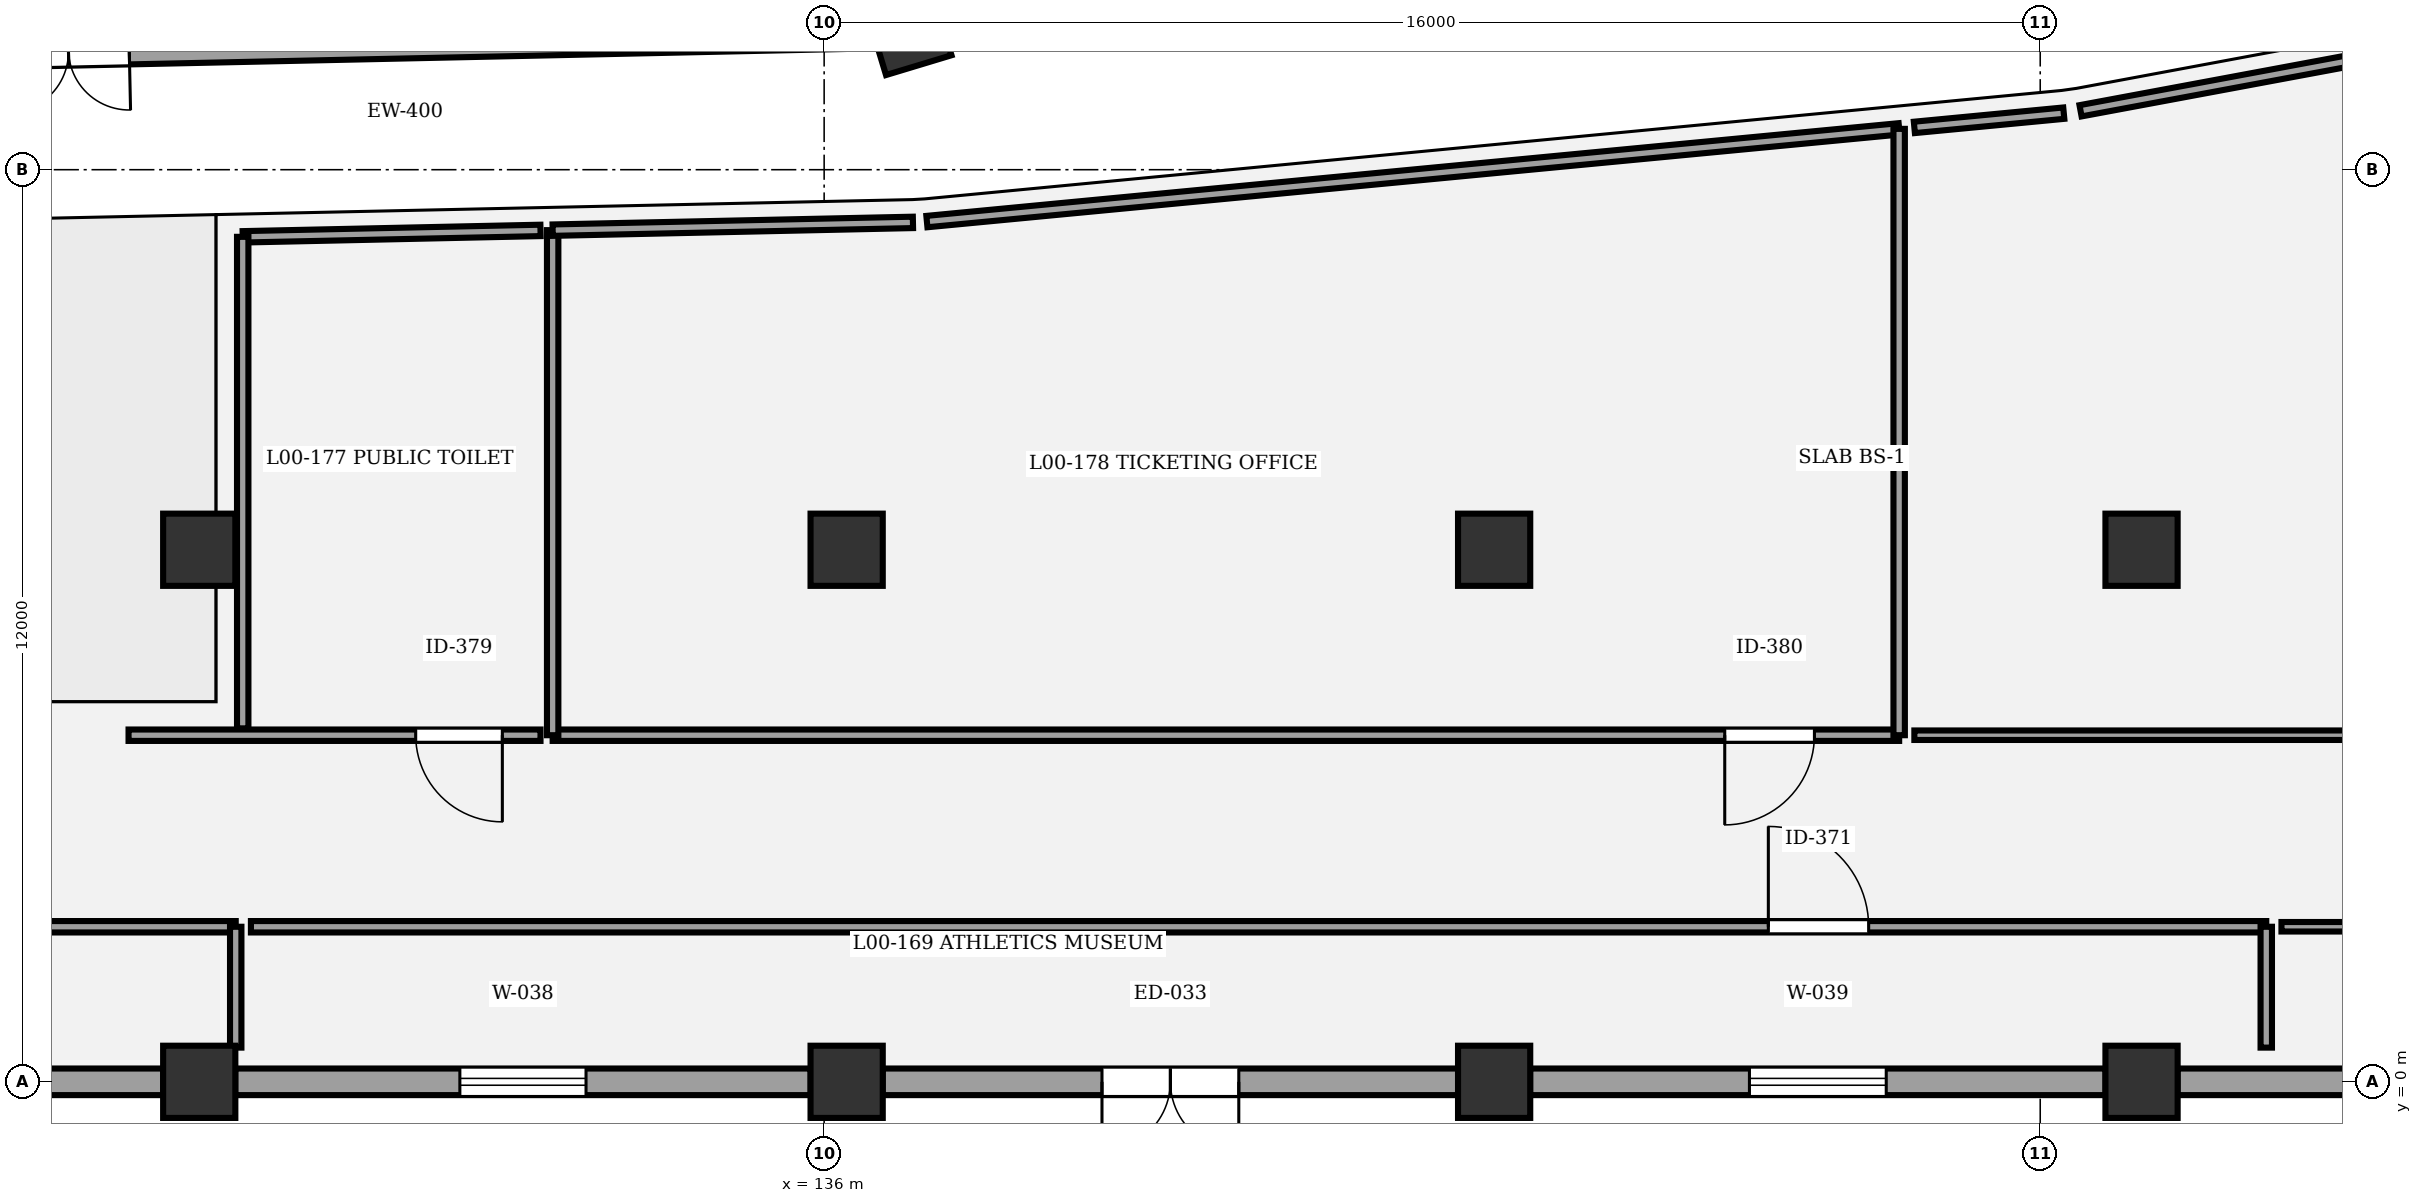
"""IFC4 building model, lengths in metres.
Left out: names, types, materials, properties, quantities, classifications, styles, units other than length and angle.
Written with IfcOpenShell. Run it as: python <this file> out.ifc"""

import sys

from ifc_helpers import new_model, si_unit, direction, frame, frame_2d, origin, origin_2d, place, context, subcontext, project, spatial, rectangle, circle, extrude, element, fill, save


model = new_model("IFC4")
c1 = context("Model", 3, precision=1e-05, world=origin(), true_north=direction((0.0, 1.0)))
c2 = subcontext(c1, "Body", "Model", "MODEL_VIEW")
j1 = project(units=[si_unit("LENGTHUNIT", "METRE"), si_unit("PLANEANGLEUNIT", "RADIAN")], contexts=[c1])
p1 = place(None, origin())
s1 = spatial("IfcSite", under=j1, at=p1, CompositionType="ELEMENT")
p2 = place(p1, origin())
s2 = spatial("IfcBuilding", under=s1, at=p2, CompositionType="ELEMENT")
p3 = place(p2, origin())
s3 = spatial("IfcBuildingStorey", under=s2, at=p3, CompositionType="ELEMENT", Elevation=0.0)
p4 = place(p3, frame((137.115, 13.806, 0.0), z_axis=(0.0, 0.0, 1.0), x_axis=(0.289198876314, -0.957269037387, 0.0)))
e1 = element("IfcColumn", 1, at=p4, inside=s3, PredefinedType="COLUMN", context=c2, shape_type="SweptSolid", body=[
    extrude(rectangle(XDim=0.9, YDim=0.9, at=origin_2d()), origin(), (0.0, 0.0, 1.0), 5.4),
])
for number, where, z_axis, x_axis in (
    (2, (127.778, 0.0, 0.0), (0.0, 0.0, 1.0), (1.0, 0.0, 0.0)),
    (3, (127.778, 7.0, 0.0), (0.0, 0.0, 1.0), (1.0, 0.0, 0.0)),
    (4, (136.296, 0.0, 0.0), (0.0, 0.0, 1.0), (1.0, 0.0, 0.0)),
    (5, (136.296, 7.0, 0.0), (0.0, 0.0, 1.0), (1.0, 0.0, 0.0)),
    (6, (144.815, 0.0, 0.0), (0.0, 0.0, 1.0), (1.0, 0.0, 0.0)),
    (7, (144.815, 7.0, 0.0), (0.0, 0.0, 1.0), (1.0, 0.0, 0.0)),
    (8, (153.333, 0.0, 0.0), (0.0, 0.0, 1.0), (1.0, 0.0, 0.0)),
    (9, (153.333, 7.0, 0.0), (0.0, 0.0, 1.0), (1.0, 0.0, 0.0)),
):
    element("IfcColumn", number, at=place(p3, frame(where, z_axis=z_axis, x_axis=x_axis)), inside=s3, PredefinedType="COLUMN", context=c2, shape_type="SweptSolid", body=[
        extrude(circle(Radius=0.475, at=origin_2d()), origin(), (0.0, 0.0, 1.0), 5.4),
    ])
p5 = place(p3, frame((136.667, 13.797, 0.0), z_axis=(0.0, 0.0, 1.0), x_axis=(-0.999768115817, -0.021534033422, 0.0)))
e10 = element("IfcWall", 10, at=p5, inside=s3, PredefinedType="STANDARD", context=c2, shape_type="SweptSolid", body=[
    extrude(rectangle(XDim=21.224, YDim=0.4, at=frame_2d((10.612, 0.0))), origin(), (0.0, 0.0, 1.0), 4.25),
])
p6 = place(p5, frame((9.812, 0.0, 0.0)))
e11 = element("IfcOpeningElement", 11, at=p6, cuts=e10, PredefinedType="OPENING", context=c2, shape_type="SweptSolid", body=[
    extrude(rectangle(XDim=1.6, YDim=2.3, at=frame_2d((0.8, 1.15))), frame((0.0, 0.21, 0.0), z_axis=(0.0, -1.0, 0.0), x_axis=(1.0, 0.0, 0.0)), (0.0, 0.0, 1.0), 0.42),
])
p7 = place(p3, frame((127.305, 0.0, 0.0), z_axis=(0.0, 0.0, 1.0), x_axis=(-1.0, 0.0, 0.0)))
e12 = element("IfcWall", 12, at=p7, inside=s3, PredefinedType="STANDARD", context=c2, shape_type="SweptSolid", body=[
    extrude(rectangle(XDim=7.573, YDim=0.35, at=frame_2d((3.787, 0.0))), origin(), (0.0, 0.0, 1.0), 4.16),
])
p8 = place(p7, frame((2.937, 0.0, 0.0)))
e13 = element("IfcOpeningElement", 13, at=p8, cuts=e12, PredefinedType="OPENING", context=c2, shape_type="SweptSolid", body=[
    extrude(rectangle(XDim=1.7, YDim=2.35, at=frame_2d((0.85, 1.175))), frame((0.0, 0.185, 0.0), z_axis=(0.0, -1.0, 0.0), x_axis=(1.0, 0.0, 0.0)), (0.0, 0.0, 1.0), 0.37),
])
p9 = place(p3, frame((135.823, 0.0, 0.0), z_axis=(0.0, 0.0, 1.0), x_axis=(-1.0, 0.0, 0.0)))
e14 = element("IfcWall", 14, at=p9, inside=s3, PredefinedType="STANDARD", context=c2, shape_type="SweptSolid", body=[
    extrude(rectangle(XDim=7.572, YDim=0.35, at=frame_2d((3.786, 0.0))), origin(), (0.0, 0.0, 1.0), 4.16),
])
p10 = place(p9, frame((2.956, 0.0, 0.9)))
e15 = element("IfcOpeningElement", 15, at=p10, cuts=e14, PredefinedType="OPENING", context=c2, shape_type="SweptSolid", body=[
    extrude(rectangle(XDim=1.66, YDim=2.15, at=frame_2d((0.83, 1.075))), frame((0.0, 0.185, 0.0), z_axis=(0.0, -1.0, 0.0), x_axis=(1.0, 0.0, 0.0)), (0.0, 0.0, 1.0), 0.37),
])
p11 = place(p3, frame((144.342, 0.0, 0.0), z_axis=(0.0, 0.0, 1.0), x_axis=(-1.0, 0.0, 0.0)))
e16 = element("IfcWall", 16, at=p11, inside=s3, PredefinedType="STANDARD", context=c2, shape_type="SweptSolid", body=[
    extrude(rectangle(XDim=7.573, YDim=0.35, at=frame_2d((3.787, 0.0))), origin(), (0.0, 0.0, 1.0), 4.16),
])
p12 = place(p11, frame((2.886, 0.0, 0.0)))
e17 = element("IfcOpeningElement", 17, at=p12, cuts=e16, PredefinedType="OPENING", context=c2, shape_type="SweptSolid", body=[
    extrude(rectangle(XDim=1.8, YDim=2.4, at=frame_2d((0.9, 1.2))), frame((0.0, 0.185, 0.0), z_axis=(0.0, -1.0, 0.0), x_axis=(1.0, 0.0, 0.0)), (0.0, 0.0, 1.0), 0.37),
])
p13 = place(p3, frame((152.86, 0.0, 0.0), z_axis=(0.0, 0.0, 1.0), x_axis=(-1.0, 0.0, 0.0)))
e18 = element("IfcWall", 18, at=p13, inside=s3, PredefinedType="STANDARD", context=c2, shape_type="SweptSolid", body=[
    extrude(rectangle(XDim=7.572, YDim=0.35, at=frame_2d((3.786, 0.0))), origin(), (0.0, 0.0, 1.0), 4.16),
])
p14 = place(p13, frame((2.886, 0.0, 0.9)))
e19 = element("IfcOpeningElement", 19, at=p14, cuts=e18, PredefinedType="OPENING", context=c2, shape_type="SweptSolid", body=[
    extrude(rectangle(XDim=1.8, YDim=2.15, at=frame_2d((0.9, 1.075))), frame((0.0, 0.185, 0.0), z_axis=(0.0, -1.0, 0.0), x_axis=(1.0, 0.0, 0.0)), (0.0, 0.0, 1.0), 0.37),
])
p15 = place(p3, frame((161.379, 0.0, 0.0), z_axis=(0.0, 0.0, 1.0), x_axis=(-1.0, 0.0, 0.0)))
e20 = element("IfcWall", 20, at=p15, inside=s3, PredefinedType="STANDARD", context=c2, shape_type="SweptSolid", body=[
    extrude(rectangle(XDim=7.573, YDim=0.35, at=frame_2d((3.787, 0.0))), origin(), (0.0, 0.0, 1.0), 4.16),
])
p16 = place(p15, frame((2.836, 0.0, 0.0)))
e21 = element("IfcOpeningElement", 21, at=p16, cuts=e20, PredefinedType="OPENING", context=c2, shape_type="SweptSolid", body=[
    extrude(rectangle(XDim=1.9, YDim=2.4, at=frame_2d((0.95, 1.2))), frame((0.0, 0.185, 0.0), z_axis=(0.0, -1.0, 0.0), x_axis=(1.0, 0.0, 0.0)), (0.0, 0.0, 1.0), 0.37),
])
p17 = place(p3, frame((101.742, 2.04, 0.0), z_axis=(0.0, 0.0, 1.0), x_axis=(1.0, 0.0, 0.0)))
e22 = element("IfcWall", 22, at=p17, inside=s3, PredefinedType="PARTITIONING", context=c2, shape_type="SweptSolid", body=[
    extrude(rectangle(XDim=26.516, YDim=0.15, at=frame_2d((13.258, 0.0))), origin(), (0.0, 0.0, 1.0), 4.15),
])
p18 = place(p17, frame((12.628, 0.0, 0.0)))
e23 = element("IfcOpeningElement", 23, at=p18, cuts=e22, PredefinedType="OPENING", context=c2, shape_type="SweptSolid", body=[
    extrude(rectangle(XDim=1.26, YDim=2.1, at=frame_2d((0.63, 1.05))), frame((0.0, 0.085, 0.0), z_axis=(0.0, -1.0, 0.0), x_axis=(1.0, 0.0, 0.0)), (0.0, 0.0, 1.0), 0.17),
])
p19 = place(p3, frame((128.458, 2.04, 0.0), z_axis=(0.0, 0.0, 1.0), x_axis=(1.0, 0.0, 0.0)))
e24 = element("IfcWall", 24, at=p19, inside=s3, PredefinedType="PARTITIONING", context=c2, shape_type="SweptSolid", body=[
    extrude(rectangle(XDim=26.516, YDim=0.15, at=frame_2d((13.258, 0.0))), origin(), (0.0, 0.0, 1.0), 4.15),
])
p20 = place(p19, frame((19.965, 0.0, 0.0)))
e25 = element("IfcOpeningElement", 25, at=p20, cuts=e24, PredefinedType="OPENING", context=c2, shape_type="SweptSolid", body=[
    extrude(rectangle(XDim=1.32, YDim=2.1, at=frame_2d((0.66, 1.05))), frame((0.0, 0.085, 0.0), z_axis=(0.0, -1.0, 0.0), x_axis=(1.0, 0.0, 0.0)), (0.0, 0.0, 1.0), 0.17),
])
p21 = place(p3, frame((155.174, 2.04, 0.0), z_axis=(0.0, 0.0, 1.0), x_axis=(1.0, 0.0, 0.0)))
e26 = element("IfcWall", 26, at=p21, inside=s3, PredefinedType="PARTITIONING", context=c2, shape_type="SweptSolid", body=[
    extrude(rectangle(XDim=20.926, YDim=0.125, at=frame_2d((10.463, 0.0))), origin(), (0.0, 0.0, 1.0), 4.15),
])
p22 = place(p21, frame((1.264, 0.0, 0.0)))
e27 = element("IfcOpeningElement", 27, at=p22, cuts=e26, PredefinedType="OPENING", context=c2, shape_type="SweptSolid", body=[
    extrude(rectangle(XDim=1.4, YDim=2.1, at=frame_2d((0.7, 1.05))), frame((0.0, 0.073, 0.0), z_axis=(0.0, -1.0, 0.0), x_axis=(1.0, 0.0, 0.0)), (0.0, 0.0, 1.0), 0.145),
])
p23 = place(p3, frame((132.268, 4.56, 0.0), z_axis=(0.0, 0.0, 1.0), x_axis=(-1.0, 0.0, 0.0)))
e28 = element("IfcWall", 28, at=p23, inside=s3, PredefinedType="PARTITIONING", context=c2, shape_type="SweptSolid", body=[
    extrude(rectangle(XDim=5.42, YDim=0.15, at=frame_2d((2.71, 0.0))), origin(), (0.0, 0.0, 1.0), 4.15),
])
p24 = place(p23, frame((0.502, 0.0, 0.0)))
e29 = element("IfcOpeningElement", 29, at=p24, cuts=e28, PredefinedType="OPENING", context=c2, shape_type="SweptSolid", body=[
    extrude(rectangle(XDim=1.14, YDim=2.2, at=frame_2d((0.57, 1.1))), frame((0.0, 0.085, 0.0), z_axis=(0.0, -1.0, 0.0), x_axis=(1.0, 0.0, 0.0)), (0.0, 0.0, 1.0), 0.17),
])
p25 = place(p3, frame((150.144, 4.56, 0.0), z_axis=(0.0, 0.0, 1.0), x_axis=(-1.0, 0.0, 0.0)))
e30 = element("IfcWall", 30, at=p25, inside=s3, PredefinedType="PARTITIONING", context=c2, shape_type="SweptSolid", body=[
    extrude(rectangle(XDim=17.716, YDim=0.15, at=frame_2d((8.858, 0.0))), origin(), (0.0, 0.0, 1.0), 4.15),
])
p26 = place(p25, frame((1.115, 0.0, 0.0)))
e31 = element("IfcOpeningElement", 31, at=p26, cuts=e30, PredefinedType="OPENING", context=c2, shape_type="SweptSolid", body=[
    extrude(rectangle(XDim=1.18, YDim=2.2, at=frame_2d((0.59, 1.1))), frame((0.0, 0.085, 0.0), z_axis=(0.0, -1.0, 0.0), x_axis=(1.0, 0.0, 0.0)), (0.0, 0.0, 1.0), 0.17),
])
p27 = place(p3, frame((173.64, 4.56, 0.0), z_axis=(0.0, 0.0, 1.0), x_axis=(-1.0, 0.0, 0.0)))
e32 = element("IfcWall", 32, at=p27, inside=s3, PredefinedType="PARTITIONING", context=c2, shape_type="SweptSolid", body=[
    extrude(rectangle(XDim=23.296, YDim=0.125, at=frame_2d((11.648, 0.0))), origin(), (0.0, 0.0, 1.0), 4.15),
])
p28 = place(p27, frame((7.823, 0.0, 0.0)))
e33 = element("IfcOpeningElement", 33, at=p28, cuts=e32, PredefinedType="OPENING", context=c2, shape_type="SweptSolid", body=[
    extrude(rectangle(XDim=1.22, YDim=2.2, at=frame_2d((0.61, 1.1))), frame((0.0, 0.073, 0.0), z_axis=(0.0, -1.0, 0.0), x_axis=(1.0, 0.0, 0.0)), (0.0, 0.0, 1.0), 0.145),
])
for number, where, z_axis, x_axis in (
    (34, (128.258, 2.04, 0.0), (0.0, 0.0, 1.0), (0.0, -1.0, 0.0)),
    (35, (154.974, 2.04, 0.0), (0.0, 0.0, 1.0), (0.0, -1.0, 0.0)),
):
    element("IfcWall", number, at=place(p3, frame(where, z_axis=z_axis, x_axis=x_axis)), inside=s3, PredefinedType="PARTITIONING", context=c2, shape_type="SweptSolid", body=[
        extrude(rectangle(XDim=1.59, YDim=0.15, at=frame_2d((0.795, 0.0))), origin(), (0.0, 0.0, 1.0), 4.15),
    ])
p29 = place(p3, frame((128.35, 11.117, 0.0), z_axis=(0.0, 0.0, 1.0), x_axis=(0.999767657321, 0.021555309661, 0.0)))
e36 = element("IfcWall", 36, at=p29, inside=s3, PredefinedType="PARTITIONING", context=c2, shape_type="SweptSolid", body=[
    extrude(rectangle(XDim=3.919, YDim=0.15, at=frame_2d((1.959, 0.0))), origin(), (0.0, 0.0, 1.0), 4.15),
])
p30 = place(p3, frame((128.35, 4.65, 0.0), z_axis=(0.0, 0.0, 1.0), x_axis=(0.0, 1.0, 0.0)))
e37 = element("IfcWall", 37, at=p30, inside=s3, PredefinedType="PARTITIONING", context=c2, shape_type="SweptSolid", body=[
    extrude(rectangle(XDim=6.467, YDim=0.15, at=frame_2d((3.233, 0.0))), origin(), (0.0, 0.0, 1.0), 4.15),
])
p31 = place(p3, frame((137.352, 11.317, 0.0), z_axis=(0.0, 0.0, 1.0), x_axis=(0.995483253835, 0.094937302124, 0.0)))
e38 = element("IfcWall", 38, at=p31, inside=s3, PredefinedType="PARTITIONING", context=c2, shape_type="SweptSolid", body=[
    extrude(rectangle(XDim=12.85, YDim=0.15, at=frame_2d((6.425, 0.0))), origin(), (0.0, 0.0, 1.0), 4.15),
])
p32 = place(p3, frame((150.144, 12.537, 0.0), z_axis=(0.0, 0.0, 1.0), x_axis=(0.0, -1.0, 0.0)))
e39 = element("IfcWall", 39, at=p32, inside=s3, PredefinedType="PARTITIONING", context=c2, shape_type="SweptSolid", body=[
    extrude(rectangle(XDim=7.977, YDim=0.15, at=frame_2d((3.989, 0.0))), origin(), (0.0, 0.0, 1.0), 4.15),
])
p33 = place(p3, frame((132.428, 4.56, 0.0), z_axis=(0.0, 0.0, 1.0), x_axis=(0.0, 1.0, 0.0)))
e40 = element("IfcWall", 40, at=p33, inside=s3, PredefinedType="PARTITIONING", context=c2, shape_type="SweptSolid", body=[
    extrude(rectangle(XDim=6.645, YDim=0.15, at=frame_2d((3.322, 0.0))), origin(), (0.0, 0.0, 1.0), 4.15),
])
p34 = place(p3, frame((132.428, 11.205, 0.0), z_axis=(0.0, 0.0, 1.0), x_axis=(0.999767254042, 0.021574006254, 0.0)))
e41 = element("IfcWall", 41, at=p34, inside=s3, PredefinedType="PARTITIONING", context=c2, shape_type="SweptSolid", body=[
    extrude(rectangle(XDim=4.742, YDim=0.15, at=frame_2d((2.371, 0.0))), origin(), (0.0, 0.0, 1.0), 4.15),
])
p35 = place(p3, frame((152.531, 12.775, 0.0), z_axis=(0.0, 0.0, 1.0), x_axis=(0.983094545276, 0.183098648406, 0.0)))
e42 = element("IfcWall", 42, at=p35, inside=s3, PredefinedType="PARTITIONING", context=c2, shape_type="SweptSolid", body=[
    extrude(rectangle(XDim=12.947, YDim=0.15, at=frame_2d((6.474, 0.0))), origin(), (0.0, 0.0, 1.0), 4.15),
])
p36 = place(p3, frame((150.344, 12.556, 0.0), z_axis=(0.0, 0.0, 1.0), x_axis=(0.995483241572, 0.094937430712, 0.0)))
e43 = element("IfcWall", 43, at=p36, inside=s3, PredefinedType="PARTITIONING", context=c2, shape_type="SweptSolid", body=[
    extrude(rectangle(XDim=1.975, YDim=0.15, at=frame_2d((0.988, 0.0))), origin(), (0.0, 0.0, 1.0), 4.15),
])
p37 = place(p6, origin())
e44 = element("IfcDoor", 44, at=p37, inside=s3, OperationType="DOUBLE_DOOR_SINGLE_SWING", PredefinedType="DOOR", context=c2, shape_type="SweptSolid", body=[
    extrude(rectangle(XDim=1.6, YDim=2.3, at=frame_2d((0.8, 1.15))), frame((0.0, 0.025, 0.0), z_axis=(0.0, -1.0, 0.0), x_axis=(1.0, 0.0, 0.0)), (0.0, 0.0, 1.0), 0.05),
])
fill(e11, e44)
p38 = place(p10, origin())
e45 = element("IfcWindow", 45, at=p38, inside=s3, PartitioningType="SINGLE_PANEL", PredefinedType="WINDOW", context=c2, shape_type="SweptSolid", body=[
    extrude(rectangle(XDim=1.66, YDim=2.15, at=frame_2d((0.83, 1.075))), frame((0.0, 0.03, 0.0), z_axis=(0.0, -1.0, 0.0), x_axis=(1.0, 0.0, 0.0)), (0.0, 0.0, 1.0), 0.06),
])
fill(e15, e45)
p39 = place(p12, origin())
e46 = element("IfcDoor", 46, at=p39, inside=s3, OperationType="DOUBLE_DOOR_SINGLE_SWING", PredefinedType="DOOR", context=c2, shape_type="SweptSolid", body=[
    extrude(rectangle(XDim=1.8, YDim=2.4, at=frame_2d((0.9, 1.2))), frame((0.0, 0.025, 0.0), z_axis=(0.0, -1.0, 0.0), x_axis=(1.0, 0.0, 0.0)), (0.0, 0.0, 1.0), 0.05),
])
fill(e17, e46)
p40 = place(p14, origin())
e47 = element("IfcWindow", 47, at=p40, inside=s3, PartitioningType="SINGLE_PANEL", PredefinedType="WINDOW", context=c2, shape_type="SweptSolid", body=[
    extrude(rectangle(XDim=1.8, YDim=2.15, at=frame_2d((0.9, 1.075))), frame((0.0, 0.03, 0.0), z_axis=(0.0, -1.0, 0.0), x_axis=(1.0, 0.0, 0.0)), (0.0, 0.0, 1.0), 0.06),
])
fill(e19, e47)
p41 = place(p20, origin())
e48 = element("IfcDoor", 48, at=p41, inside=s3, OperationType="SINGLE_SWING_LEFT", PredefinedType="DOOR", context=c2, shape_type="SweptSolid", body=[
    extrude(rectangle(XDim=1.32, YDim=2.1, at=frame_2d((0.66, 1.05))), frame((0.0, 0.025, 0.0), z_axis=(0.0, -1.0, 0.0), x_axis=(1.0, 0.0, 0.0)), (0.0, 0.0, 1.0), 0.05),
])
fill(e25, e48)
p42 = place(p24, origin())
e49 = element("IfcDoor", 49, at=p42, inside=s3, OperationType="SINGLE_SWING_LEFT", PredefinedType="DOOR", context=c2, shape_type="SweptSolid", body=[
    extrude(rectangle(XDim=1.14, YDim=2.2, at=frame_2d((0.57, 1.1))), frame((0.0, 0.025, 0.0), z_axis=(0.0, -1.0, 0.0), x_axis=(1.0, 0.0, 0.0)), (0.0, 0.0, 1.0), 0.05),
])
fill(e29, e49)
p43 = place(p26, origin())
e50 = element("IfcDoor", 50, at=p43, inside=s3, OperationType="SINGLE_SWING_RIGHT", PredefinedType="DOOR", context=c2, shape_type="SweptSolid", body=[
    extrude(rectangle(XDim=1.18, YDim=2.2, at=frame_2d((0.59, 1.1))), frame((0.0, 0.025, 0.0), z_axis=(0.0, -1.0, 0.0), x_axis=(1.0, 0.0, 0.0)), (0.0, 0.0, 1.0), 0.05),
])
fill(e31, e50)
save(model, sys.argv[1])
